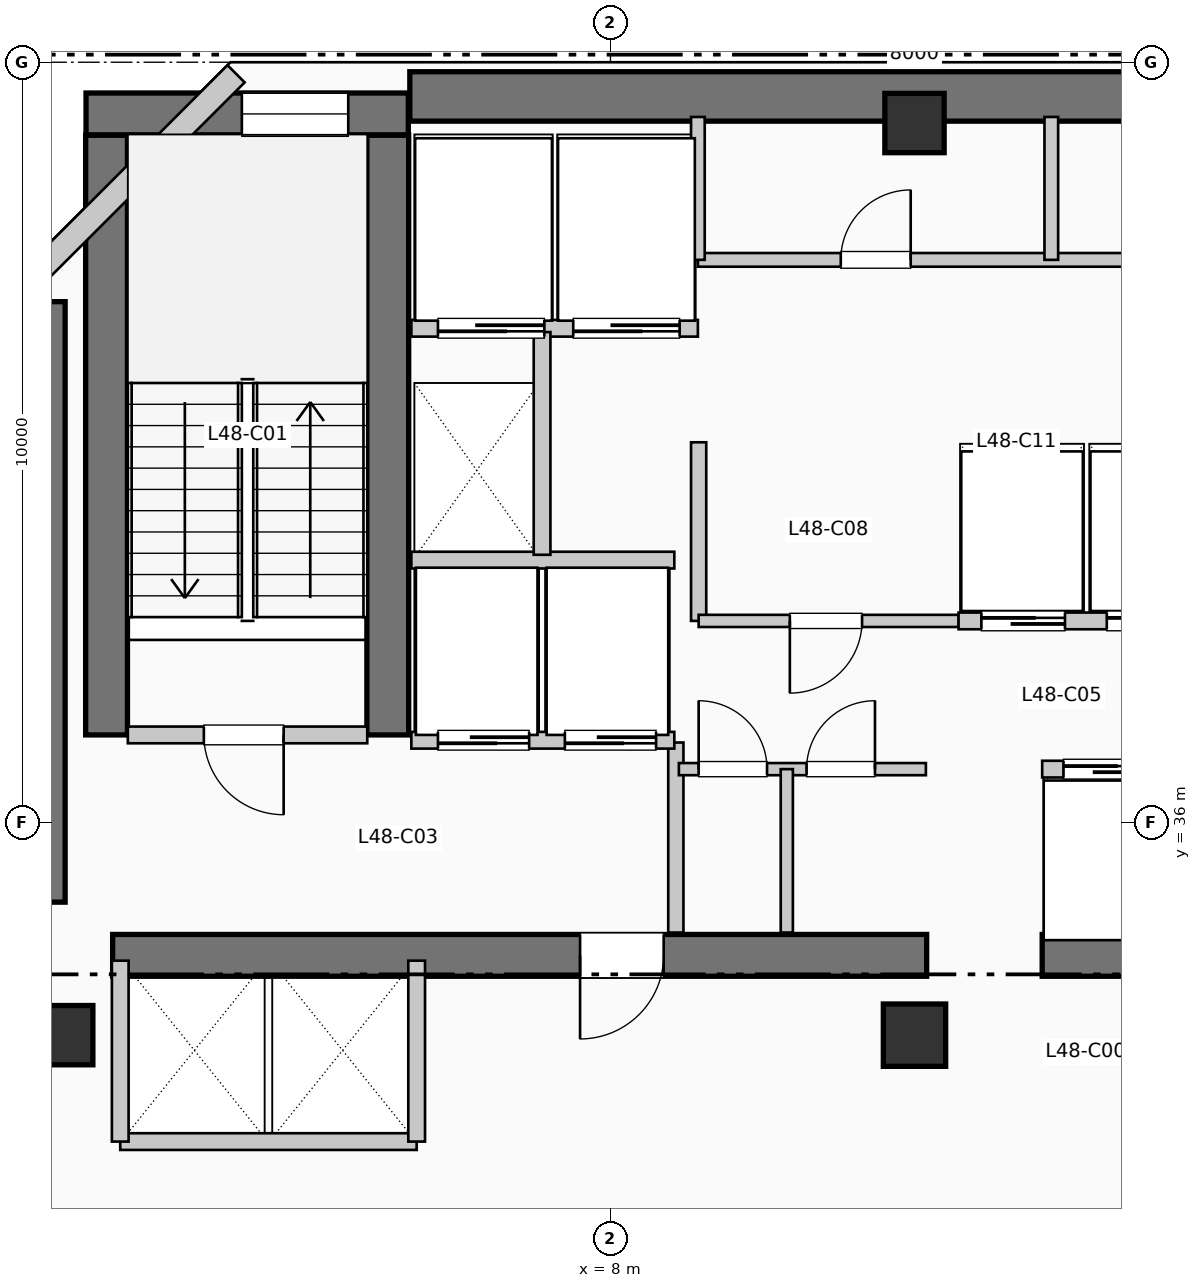
"""IFC4 building model, lengths in metres.
Left out: names, types, materials, properties, quantities, classifications, styles, units other than length and angle.
Written with IfcOpenShell. Run it as: python <this file> out.ifc"""

import sys

from ifc_helpers import new_model, si_unit, direction, frame, frame_2d, origin, origin_2d, place, context, subcontext, project, spatial, rectangle, extrude, element, fill, save


model = new_model("IFC4")
c1 = context("Model", 3, precision=1e-05, world=origin(), true_north=direction((0.0, 1.0)))
c2 = subcontext(c1, "Body", "Model", "MODEL_VIEW")
j1 = project(units=[si_unit("LENGTHUNIT", "METRE"), si_unit("PLANEANGLEUNIT", "RADIAN")], contexts=[c1])
p1 = place(None, origin())
s1 = spatial("IfcSite", under=j1, at=p1, CompositionType="ELEMENT")
p2 = place(p1, origin())
s2 = spatial("IfcBuilding", under=s1, at=p2, CompositionType="ELEMENT")
p3 = place(p2, frame((0.0, 0.0, 199.32)))
s3 = spatial("IfcBuildingStorey", under=s2, at=p3, CompositionType="ELEMENT", Elevation=199.32)
p4 = place(p3, frame((5.36, 45.55, 0.0), z_axis=(0.0, 0.0, 1.0), x_axis=(1.0, 0.0, 0.0)))
e1 = element("IfcWall", 1, at=p4, inside=s3, PredefinedType="SHEAR", context=c2, shape_type="SweptSolid", body=[
    extrude(rectangle(XDim=13.98, YDim=0.65, at=frame_2d((6.99, 0.0))), origin(), (0.0, 0.0, 1.0), 3.96),
])
p5 = place(p3, frame((0.5, 34.95, 0.0), z_axis=(0.0, 0.0, 1.0), x_axis=(0.0, 1.0, 0.0)))
e2 = element("IfcWall", 2, at=p5, inside=s3, PredefinedType="SHEAR", context=c2, shape_type="SweptSolid", body=[
    extrude(rectangle(XDim=7.9, YDim=0.65, at=frame_2d((3.95, 0.0))), origin(), (0.0, 0.0, 1.0), 3.96),
])
p6 = place(p3, frame((1.45, 34.25, 0.0), z_axis=(0.0, 0.0, 1.0), x_axis=(1.0, 0.0, 0.0)))
e3 = element("IfcWall", 3, at=p6, inside=s3, PredefinedType="SHEAR", context=c2, shape_type="SweptSolid", body=[
    extrude(rectangle(XDim=10.71, YDim=0.55, at=frame_2d((5.355, 0.0))), origin(), (0.0, 0.0, 1.0), 3.96),
])
p7 = place(p6, frame((7.25, 0.0, 0.0), z_axis=(0.0, 0.0, 1.0), x_axis=(-1.0, 0.0, 0.0)))
e4 = element("IfcOpeningElement", 4, at=p7, cuts=e3, PredefinedType="OPENING", context=c2, shape_type="SweptSolid", body=[
    extrude(rectangle(XDim=1.1, YDim=2.15, at=frame_2d((0.55, 1.075))), frame((0.0, 0.285, 0.0), z_axis=(0.0, -1.0, 0.0), x_axis=(1.0, 0.0, 0.0)), (0.0, 0.0, 1.0), 0.57),
])
p8 = place(p3, frame((13.68, 34.25, 0.0), z_axis=(0.0, 0.0, 1.0), x_axis=(1.0, 0.0, 0.0)))
e5 = element("IfcWall", 5, at=p8, inside=s3, PredefinedType="SHEAR", context=c2, shape_type="SweptSolid", body=[
    extrude(rectangle(XDim=6.12, YDim=0.55, at=frame_2d((3.06, 0.0))), origin(), (0.0, 0.0, 1.0), 3.96),
])
for number, where, z_axis, x_axis in (
    (6, (1.37, 37.15, 0.0), (0.0, 0.0, 1.0), (0.0, 1.0, 0.0)),
    (7, (5.07, 37.15, 0.0), (0.0, 0.0, 1.0), (0.0, 1.0, 0.0)),
):
    element("IfcWall", number, at=place(p3, frame(where, z_axis=z_axis, x_axis=x_axis)), inside=s3, PredefinedType="SHEAR", context=c2, shape_type="SweptSolid", body=[
        extrude(rectangle(XDim=7.89, YDim=0.55, at=frame_2d((3.945, 0.0))), origin(), (0.0, 0.0, 1.0), 3.96),
    ])
p9 = place(p3, frame((1.1, 45.32, 0.0), z_axis=(0.0, 0.0, 1.0), x_axis=(1.0, 0.0, 0.0)))
e8 = element("IfcWall", 8, at=p9, inside=s3, PredefinedType="SHEAR", context=c2, shape_type="SweptSolid", body=[
    extrude(rectangle(XDim=4.24, YDim=0.55, at=frame_2d((2.12, 0.0))), origin(), (0.0, 0.0, 1.0), 3.96),
])
p10 = place(p9, frame((2.05, 0.0, 1.05)))
e9 = element("IfcOpeningElement", 9, at=p10, cuts=e8, PredefinedType="OPENING", context=c2, shape_type="SweptSolid", body=[
    extrude(rectangle(XDim=1.4, YDim=1.8, at=frame_2d((0.7, 0.9))), frame((0.0, 0.285, 0.0), z_axis=(0.0, -1.0, 0.0), x_axis=(1.0, 0.0, 0.0)), (0.0, 0.0, 1.0), 0.57),
])
p11 = place(p3, frame((0.8, 33.2, 0.0), z_axis=(0.0, 0.0, 1.0), x_axis=(1.0, 0.0, 0.0)))
e10 = element("IfcColumn", 10, at=p11, inside=s3, PredefinedType="COLUMN", context=c2, shape_type="SweptSolid", body=[
    extrude(rectangle(XDim=0.78, YDim=0.78, at=origin_2d()), origin(), (0.0, 0.0, 1.0), 3.96),
])
p12 = place(p3, frame((12.0, 33.2, 0.0), z_axis=(0.0, 0.0, 1.0), x_axis=(1.0, 0.0, 0.0)))
e11 = element("IfcColumn", 11, at=p12, inside=s3, PredefinedType="COLUMN", context=c2, shape_type="SweptSolid", body=[
    extrude(rectangle(XDim=0.82, YDim=0.82, at=origin_2d()), origin(), (0.0, 0.0, 1.0), 3.96),
])
p13 = place(p3, frame((12.0, 45.2, 0.0), z_axis=(0.0, 0.0, 1.0), x_axis=(1.0, 0.0, 0.0)))
e12 = element("IfcColumn", 12, at=p13, inside=s3, PredefinedType="COLUMN", context=c2, shape_type="SweptSolid", body=[
    extrude(rectangle(XDim=0.78, YDim=0.78, at=origin_2d()), origin(), (0.0, 0.0, 1.0), 3.96),
])
p14 = place(p3, frame((3.074, 45.848, 0.0), z_axis=(0.0, 0.0, 1.0), x_axis=(-0.707106781187, -0.707106781187, 0.0)))
e13 = element("IfcWall", 13, at=p14, inside=s3, PredefinedType="SOLIDWALL", context=c2, shape_type="SweptSolid", body=[
    extrude(rectangle(XDim=4.133, YDim=0.32, at=frame_2d((2.066, 0.0))), origin(), (0.0, 0.0, 1.0), 3.71),
])
p15 = place(p3, frame((1.65, 37.15, 0.0), z_axis=(0.0, 0.0, 1.0), x_axis=(1.0, 0.0, 0.0)))
e14 = element("IfcWall", 14, at=p15, inside=s3, PredefinedType="PARTITIONING", context=c2, shape_type="SweptSolid", body=[
    extrude(rectangle(XDim=3.15, YDim=0.22, at=frame_2d((1.575, 0.0))), origin(), (0.0, 0.0, 1.0), 3.71),
])
p16 = place(p15, frame((2.05, 0.0, 0.0), z_axis=(0.0, 0.0, 1.0), x_axis=(-1.0, 0.0, 0.0)))
e15 = element("IfcOpeningElement", 15, at=p16, cuts=e14, PredefinedType="OPENING", context=c2, shape_type="SweptSolid", body=[
    extrude(rectangle(XDim=1.05, YDim=2.15, at=frame_2d((0.525, 1.075))), frame((0.0, 0.12, 0.0), z_axis=(0.0, -1.0, 0.0), x_axis=(1.0, 0.0, 0.0)), (0.0, 0.0, 1.0), 0.24),
])
p17 = place(p3, frame((8.86, 34.55, 0.0), z_axis=(0.0, 0.0, 1.0), x_axis=(0.0, 1.0, 0.0)))
e16 = element("IfcWall", 16, at=p17, inside=s3, PredefinedType="PARTITIONING", context=c2, shape_type="SweptSolid", body=[
    extrude(rectangle(XDim=2.5, YDim=0.2, at=frame_2d((1.25, 0.0))), origin(), (0.0, 0.0, 1.0), 3.71),
])
p18 = place(p3, frame((5.38, 37.08, 0.0), z_axis=(0.0, 0.0, 1.0), x_axis=(1.0, 0.0, 0.0)))
e17 = element("IfcWall", 17, at=p18, inside=s3, PredefinedType="PARTITIONING", context=c2, shape_type="SweptSolid", body=[
    extrude(rectangle(XDim=3.46, YDim=0.22, at=frame_2d((1.73, 0.0))), origin(), (0.0, 0.0, 1.0), 3.71),
])
p19 = place(p18, frame((1.55, 0.0, 0.0), z_axis=(0.0, 0.0, 1.0), x_axis=(-1.0, 0.0, 0.0)))
e18 = element("IfcOpeningElement", 18, at=p19, cuts=e17, PredefinedType="OPENING", context=c2, shape_type="SweptSolid", body=[
    extrude(rectangle(XDim=1.2, YDim=2.2, at=frame_2d((0.6, 1.1))), frame((0.0, 0.12, 0.0), z_axis=(0.0, -1.0, 0.0), x_axis=(1.0, 0.0, 0.0)), (0.0, 0.0, 1.0), 0.24),
])
p20 = place(p18, frame((3.22, 0.0, 0.0), z_axis=(0.0, 0.0, 1.0), x_axis=(-1.0, 0.0, 0.0)))
e19 = element("IfcOpeningElement", 19, at=p20, cuts=e17, PredefinedType="OPENING", context=c2, shape_type="SweptSolid", body=[
    extrude(rectangle(XDim=1.2, YDim=2.2, at=frame_2d((0.6, 1.1))), frame((0.0, 0.12, 0.0), z_axis=(0.0, -1.0, 0.0), x_axis=(1.0, 0.0, 0.0)), (0.0, 0.0, 1.0), 0.24),
])
p21 = place(p3, frame((5.38, 39.45, 0.0), z_axis=(0.0, 0.0, 1.0), x_axis=(1.0, 0.0, 0.0)))
e20 = element("IfcWall", 20, at=p21, inside=s3, PredefinedType="PARTITIONING", context=c2, shape_type="SweptSolid", body=[
    extrude(rectangle(XDim=3.46, YDim=0.22, at=frame_2d((1.73, 0.0))), origin(), (0.0, 0.0, 1.0), 3.71),
])
p22 = place(p3, frame((5.38, 42.5, 0.0), z_axis=(0.0, 0.0, 1.0), x_axis=(1.0, 0.0, 0.0)))
e21 = element("IfcWall", 21, at=p22, inside=s3, PredefinedType="PARTITIONING", context=c2, shape_type="SweptSolid", body=[
    extrude(rectangle(XDim=3.77, YDim=0.22, at=frame_2d((1.885, 0.0))), origin(), (0.0, 0.0, 1.0), 3.71),
])
p23 = place(p22, frame((1.75, 0.0, 0.0), z_axis=(0.0, 0.0, 1.0), x_axis=(-1.0, 0.0, 0.0)))
e22 = element("IfcOpeningElement", 22, at=p23, cuts=e21, PredefinedType="OPENING", context=c2, shape_type="SweptSolid", body=[
    extrude(rectangle(XDim=1.4, YDim=2.2, at=frame_2d((0.7, 1.1))), frame((0.0, 0.12, 0.0), z_axis=(0.0, -1.0, 0.0), x_axis=(1.0, 0.0, 0.0)), (0.0, 0.0, 1.0), 0.24),
])
p24 = place(p22, frame((3.53, 0.0, 0.0), z_axis=(0.0, 0.0, 1.0), x_axis=(-1.0, 0.0, 0.0)))
e23 = element("IfcOpeningElement", 23, at=p24, cuts=e21, PredefinedType="OPENING", context=c2, shape_type="SweptSolid", body=[
    extrude(rectangle(XDim=1.4, YDim=2.2, at=frame_2d((0.7, 1.1))), frame((0.0, 0.12, 0.0), z_axis=(0.0, -1.0, 0.0), x_axis=(1.0, 0.0, 0.0)), (0.0, 0.0, 1.0), 0.24),
])
p25 = place(p3, frame((7.1, 39.52, 0.0), z_axis=(0.0, 0.0, 1.0), x_axis=(0.0, 1.0, 0.0)))
e24 = element("IfcWall", 24, at=p25, inside=s3, PredefinedType="PARTITIONING", context=c2, shape_type="SweptSolid", body=[
    extrude(rectangle(XDim=2.93, YDim=0.22, at=frame_2d((1.465, 0.0))), origin(), (0.0, 0.0, 1.0), 3.71),
])
p26 = place(p3, frame((1.55, 31.8, 0.0), z_axis=(0.0, 0.0, 1.0), x_axis=(1.0, 0.0, 0.0)))
e25 = element("IfcWall", 25, at=p26, inside=s3, PredefinedType="PARTITIONING", context=c2, shape_type="SweptSolid", body=[
    extrude(rectangle(XDim=3.9, YDim=0.22, at=frame_2d((1.95, 0.0))), origin(), (0.0, 0.0, 1.0), 3.71),
])
for number, where, z_axis, x_axis in (
    (26, (1.55, 31.8, 0.0), (0.0, 0.0, 1.0), (0.0, 1.0, 0.0)),
    (27, (5.45, 31.8, 0.0), (0.0, 0.0, 1.0), (0.0, 1.0, 0.0)),
):
    element("IfcWall", number, at=place(p3, frame(where, z_axis=z_axis, x_axis=x_axis)), inside=s3, PredefinedType="PARTITIONING", context=c2, shape_type="SweptSolid", body=[
        extrude(rectangle(XDim=2.38, YDim=0.22, at=frame_2d((1.19, 0.0))), origin(), (0.0, 0.0, 1.0), 3.71),
    ])
p27 = place(p3, frame((9.16, 38.65, 0.0), z_axis=(0.0, 0.0, 1.0), x_axis=(0.0, 1.0, 0.0)))
e28 = element("IfcWall", 28, at=p27, inside=s3, PredefinedType="PARTITIONING", context=c2, shape_type="SweptSolid", body=[
    extrude(rectangle(XDim=2.35, YDim=0.2, at=frame_2d((1.175, 0.0))), origin(), (0.0, 0.0, 1.0), 3.71),
])
p28 = place(p3, frame((8.9, 36.7, 0.0), z_axis=(0.0, 0.0, 1.0), x_axis=(1.0, 0.0, 0.0)))
e29 = element("IfcWall", 29, at=p28, inside=s3, PredefinedType="PARTITIONING", context=c2, shape_type="SweptSolid", body=[
    extrude(rectangle(XDim=3.25, YDim=0.16, at=frame_2d((1.625, 0.0))), origin(), (0.0, 0.0, 1.0), 3.71),
])
p29 = place(p28, frame((0.26, 0.0, 0.0)))
e30 = element("IfcOpeningElement", 30, at=p29, cuts=e29, PredefinedType="OPENING", context=c2, shape_type="SweptSolid", body=[
    extrude(rectangle(XDim=0.9, YDim=2.15, at=frame_2d((0.45, 1.075))), frame((0.0, 0.09, 0.0), z_axis=(0.0, -1.0, 0.0), x_axis=(1.0, 0.0, 0.0)), (0.0, 0.0, 1.0), 0.18),
])
p30 = place(p28, frame((1.68, 0.0, 0.0)))
e31 = element("IfcOpeningElement", 31, at=p30, cuts=e29, PredefinedType="OPENING", context=c2, shape_type="SweptSolid", body=[
    extrude(rectangle(XDim=0.9, YDim=2.15, at=frame_2d((0.45, 1.075))), frame((0.0, 0.09, 0.0), z_axis=(0.0, -1.0, 0.0), x_axis=(1.0, 0.0, 0.0)), (0.0, 0.0, 1.0), 0.18),
])
p31 = place(p3, frame((10.32, 34.55, 0.0), z_axis=(0.0, 0.0, 1.0), x_axis=(0.0, 1.0, 0.0)))
e32 = element("IfcWall", 32, at=p31, inside=s3, PredefinedType="PARTITIONING", context=c2, shape_type="SweptSolid", body=[
    extrude(rectangle(XDim=2.15, YDim=0.16, at=frame_2d((1.075, 0.0))), origin(), (0.0, 0.0, 1.0), 3.71),
])
p32 = place(p3, frame((9.16, 38.65, 0.0), z_axis=(0.0, 0.0, 1.0), x_axis=(1.0, 0.0, 0.0)))
e33 = element("IfcWall", 33, at=p32, inside=s3, PredefinedType="PARTITIONING", context=c2, shape_type="SweptSolid", body=[
    extrude(rectangle(XDim=3.42, YDim=0.16, at=frame_2d((1.71, 0.0))), origin(), (0.0, 0.0, 1.0), 3.71),
])
p33 = place(p32, frame((2.15, 0.0, 0.0), z_axis=(0.0, 0.0, 1.0), x_axis=(-1.0, 0.0, 0.0)))
e34 = element("IfcOpeningElement", 34, at=p33, cuts=e33, PredefinedType="OPENING", context=c2, shape_type="SweptSolid", body=[
    extrude(rectangle(XDim=0.95, YDim=2.15, at=frame_2d((0.475, 1.075))), frame((0.0, 0.09, 0.0), z_axis=(0.0, -1.0, 0.0), x_axis=(1.0, 0.0, 0.0)), (0.0, 0.0, 1.0), 0.18),
])
p34 = place(p3, frame((13.68, 36.7, 0.0), z_axis=(0.0, 0.0, 1.0), x_axis=(1.0, 0.0, 0.0)))
e35 = element("IfcWall", 35, at=p34, inside=s3, PredefinedType="PARTITIONING", context=c2, shape_type="SweptSolid", body=[
    extrude(rectangle(XDim=3.28, YDim=0.22, at=frame_2d((1.64, 0.0))), origin(), (0.0, 0.0, 1.0), 3.71),
])
p35 = place(p34, frame((0.28, 0.0, 0.0)))
e36 = element("IfcOpeningElement", 36, at=p35, cuts=e35, PredefinedType="OPENING", context=c2, shape_type="SweptSolid", body=[
    extrude(rectangle(XDim=1.1, YDim=2.2, at=frame_2d((0.55, 1.1))), frame((0.0, 0.12, 0.0), z_axis=(0.0, -1.0, 0.0), x_axis=(1.0, 0.0, 0.0)), (0.0, 0.0, 1.0), 0.24),
])
p36 = place(p34, frame((1.9, 0.0, 0.0)))
e37 = element("IfcOpeningElement", 37, at=p36, cuts=e35, PredefinedType="OPENING", context=c2, shape_type="SweptSolid", body=[
    extrude(rectangle(XDim=1.1, YDim=2.2, at=frame_2d((0.55, 1.1))), frame((0.0, 0.12, 0.0), z_axis=(0.0, -1.0, 0.0), x_axis=(1.0, 0.0, 0.0)), (0.0, 0.0, 1.0), 0.24),
])
p37 = place(p3, frame((12.58, 38.65, 0.0), z_axis=(0.0, 0.0, 1.0), x_axis=(1.0, 0.0, 0.0)))
e38 = element("IfcWall", 38, at=p37, inside=s3, PredefinedType="PARTITIONING", context=c2, shape_type="SweptSolid", body=[
    extrude(rectangle(XDim=3.38, YDim=0.22, at=frame_2d((1.69, 0.0))), origin(), (0.0, 0.0, 1.0), 3.71),
])
p38 = place(p37, frame((0.3, 0.0, 0.0)))
e39 = element("IfcOpeningElement", 39, at=p38, cuts=e38, PredefinedType="OPENING", context=c2, shape_type="SweptSolid", body=[
    extrude(rectangle(XDim=1.1, YDim=2.2, at=frame_2d((0.55, 1.1))), frame((0.0, 0.12, 0.0), z_axis=(0.0, -1.0, 0.0), x_axis=(1.0, 0.0, 0.0)), (0.0, 0.0, 1.0), 0.24),
])
p39 = place(p37, frame((1.95, 0.0, 0.0)))
e40 = element("IfcOpeningElement", 40, at=p39, cuts=e38, PredefinedType="OPENING", context=c2, shape_type="SweptSolid", body=[
    extrude(rectangle(XDim=1.1, YDim=2.2, at=frame_2d((0.55, 1.1))), frame((0.0, 0.12, 0.0), z_axis=(0.0, -1.0, 0.0), x_axis=(1.0, 0.0, 0.0)), (0.0, 0.0, 1.0), 0.24),
])
p40 = place(p3, frame((9.15, 43.4, 0.0), z_axis=(0.0, 0.0, 1.0), x_axis=(1.0, 0.0, 0.0)))
e41 = element("IfcWall", 41, at=p40, inside=s3, PredefinedType="PLUMBINGWALL", context=c2, shape_type="SweptSolid", body=[
    extrude(rectangle(XDim=9.33, YDim=0.18, at=frame_2d((4.665, 0.0))), origin(), (0.0, 0.0, 1.0), 3.71),
])
p41 = place(p40, frame((1.88, 0.0, 0.0)))
e42 = element("IfcOpeningElement", 42, at=p41, cuts=e41, PredefinedType="OPENING", context=c2, shape_type="SweptSolid", body=[
    extrude(rectangle(XDim=0.92, YDim=2.1, at=frame_2d((0.46, 1.05))), frame((0.0, 0.1, 0.0), z_axis=(0.0, -1.0, 0.0), x_axis=(1.0, 0.0, 0.0)), (0.0, 0.0, 1.0), 0.2),
])
p42 = place(p40, frame((6.515, 0.0, 0.0)))
e43 = element("IfcOpeningElement", 43, at=p42, cuts=e41, PredefinedType="OPENING", context=c2, shape_type="SweptSolid", body=[
    extrude(rectangle(XDim=0.92, YDim=2.1, at=frame_2d((0.46, 1.05))), frame((0.0, 0.1, 0.0), z_axis=(0.0, -1.0, 0.0), x_axis=(1.0, 0.0, 0.0)), (0.0, 0.0, 1.0), 0.2),
])
for number, where, z_axis, x_axis in (
    (44, (9.15, 43.4, 0.0), (0.0, 0.0, 1.0), (0.0, 1.0, 0.0)),
    (45, (13.8, 43.4, 0.0), (0.0, 0.0, 1.0), (0.0, 1.0, 0.0)),
):
    element("IfcWall", number, at=place(p3, frame(where, z_axis=z_axis, x_axis=x_axis)), inside=s3, PredefinedType="PLUMBINGWALL", context=c2, shape_type="SweptSolid", body=[
        extrude(rectangle(XDim=1.88, YDim=0.18, at=frame_2d((0.94, 0.0))), origin(), (0.0, 0.0, 1.0), 3.71),
    ])
p43 = place(p10, origin())
e46 = element("IfcWindow", 46, at=p43, inside=s3, PartitioningType="SINGLE_PANEL", PredefinedType="WINDOW", context=c2, shape_type="SweptSolid", body=[
    extrude(rectangle(XDim=1.4, YDim=1.8, at=frame_2d((0.7, 0.9))), frame((0.0, 0.03, 0.0), z_axis=(0.0, -1.0, 0.0), x_axis=(1.0, 0.0, 0.0)), (0.0, 0.0, 1.0), 0.06),
])
fill(e9, e46)
p44 = place(p16, origin())
e47 = element("IfcDoor", 47, at=p44, inside=s3, OperationType="SINGLE_SWING_RIGHT", PredefinedType="DOOR", context=c2, shape_type="SweptSolid", body=[
    extrude(rectangle(XDim=1.05, YDim=2.15, at=frame_2d((0.525, 1.075))), frame((0.0, 0.025, 0.0), z_axis=(0.0, -1.0, 0.0), x_axis=(1.0, 0.0, 0.0)), (0.0, 0.0, 1.0), 0.05),
])
fill(e15, e47)
p45 = place(p7, origin())
e48 = element("IfcDoor", 48, at=p45, inside=s3, OperationType="SINGLE_SWING_LEFT", PredefinedType="DOOR", context=c2, shape_type="SweptSolid", body=[
    extrude(rectangle(XDim=1.1, YDim=2.15, at=frame_2d((0.55, 1.075))), frame((0.0, 0.025, 0.0), z_axis=(0.0, -1.0, 0.0), x_axis=(1.0, 0.0, 0.0)), (0.0, 0.0, 1.0), 0.05),
])
fill(e4, e48)
p46 = place(p19, origin())
e49 = element("IfcDoor", 49, at=p46, inside=s3, OperationType="SLIDING_TO_RIGHT", PredefinedType="DOOR", context=c2, shape_type="SweptSolid", body=[
    extrude(rectangle(XDim=1.2, YDim=2.2, at=frame_2d((0.6, 1.1))), frame((0.0, 0.025, 0.0), z_axis=(0.0, -1.0, 0.0), x_axis=(1.0, 0.0, 0.0)), (0.0, 0.0, 1.0), 0.05),
])
fill(e18, e49)
p47 = place(p20, origin())
e50 = element("IfcDoor", 50, at=p47, inside=s3, OperationType="SLIDING_TO_RIGHT", PredefinedType="DOOR", context=c2, shape_type="SweptSolid", body=[
    extrude(rectangle(XDim=1.2, YDim=2.2, at=frame_2d((0.6, 1.1))), frame((0.0, 0.025, 0.0), z_axis=(0.0, -1.0, 0.0), x_axis=(1.0, 0.0, 0.0)), (0.0, 0.0, 1.0), 0.05),
])
fill(e19, e50)
p48 = place(p23, origin())
e51 = element("IfcDoor", 51, at=p48, inside=s3, OperationType="SLIDING_TO_LEFT", PredefinedType="DOOR", context=c2, shape_type="SweptSolid", body=[
    extrude(rectangle(XDim=1.4, YDim=2.2, at=frame_2d((0.7, 1.1))), frame((0.0, 0.025, 0.0), z_axis=(0.0, -1.0, 0.0), x_axis=(1.0, 0.0, 0.0)), (0.0, 0.0, 1.0), 0.05),
])
fill(e22, e51)
p49 = place(p24, origin())
e52 = element("IfcDoor", 52, at=p49, inside=s3, OperationType="SLIDING_TO_LEFT", PredefinedType="DOOR", context=c2, shape_type="SweptSolid", body=[
    extrude(rectangle(XDim=1.4, YDim=2.2, at=frame_2d((0.7, 1.1))), frame((0.0, 0.025, 0.0), z_axis=(0.0, -1.0, 0.0), x_axis=(1.0, 0.0, 0.0)), (0.0, 0.0, 1.0), 0.05),
])
fill(e23, e52)
p50 = place(p29, origin())
e53 = element("IfcDoor", 53, at=p50, inside=s3, OperationType="SINGLE_SWING_LEFT", PredefinedType="DOOR", context=c2, shape_type="SweptSolid", body=[
    extrude(rectangle(XDim=0.9, YDim=2.15, at=frame_2d((0.45, 1.075))), frame((0.0, 0.025, 0.0), z_axis=(0.0, -1.0, 0.0), x_axis=(1.0, 0.0, 0.0)), (0.0, 0.0, 1.0), 0.05),
])
fill(e30, e53)
p51 = place(p30, origin())
e54 = element("IfcDoor", 54, at=p51, inside=s3, OperationType="SINGLE_SWING_RIGHT", PredefinedType="DOOR", context=c2, shape_type="SweptSolid", body=[
    extrude(rectangle(XDim=0.9, YDim=2.15, at=frame_2d((0.45, 1.075))), frame((0.0, 0.025, 0.0), z_axis=(0.0, -1.0, 0.0), x_axis=(1.0, 0.0, 0.0)), (0.0, 0.0, 1.0), 0.05),
])
fill(e31, e54)
p52 = place(p33, origin())
e55 = element("IfcDoor", 55, at=p52, inside=s3, OperationType="SINGLE_SWING_LEFT", PredefinedType="DOOR", context=c2, shape_type="SweptSolid", body=[
    extrude(rectangle(XDim=0.95, YDim=2.15, at=frame_2d((0.475, 1.075))), frame((0.0, 0.025, 0.0), z_axis=(0.0, -1.0, 0.0), x_axis=(1.0, 0.0, 0.0)), (0.0, 0.0, 1.0), 0.05),
])
fill(e34, e55)
p53 = place(p35, origin())
e56 = element("IfcDoor", 56, at=p53, inside=s3, OperationType="SLIDING_TO_RIGHT", PredefinedType="DOOR", context=c2, shape_type="SweptSolid", body=[
    extrude(rectangle(XDim=1.1, YDim=2.2, at=frame_2d((0.55, 1.1))), frame((0.0, 0.025, 0.0), z_axis=(0.0, -1.0, 0.0), x_axis=(1.0, 0.0, 0.0)), (0.0, 0.0, 1.0), 0.05),
])
fill(e36, e56)
p54 = place(p38, origin())
e57 = element("IfcDoor", 57, at=p54, inside=s3, OperationType="SLIDING_TO_RIGHT", PredefinedType="DOOR", context=c2, shape_type="SweptSolid", body=[
    extrude(rectangle(XDim=1.1, YDim=2.2, at=frame_2d((0.55, 1.1))), frame((0.0, 0.025, 0.0), z_axis=(0.0, -1.0, 0.0), x_axis=(1.0, 0.0, 0.0)), (0.0, 0.0, 1.0), 0.05),
])
fill(e39, e57)
p55 = place(p39, origin())
e58 = element("IfcDoor", 58, at=p55, inside=s3, OperationType="SLIDING_TO_RIGHT", PredefinedType="DOOR", context=c2, shape_type="SweptSolid", body=[
    extrude(rectangle(XDim=1.1, YDim=2.2, at=frame_2d((0.55, 1.1))), frame((0.0, 0.025, 0.0), z_axis=(0.0, -1.0, 0.0), x_axis=(1.0, 0.0, 0.0)), (0.0, 0.0, 1.0), 0.05),
])
fill(e40, e58)
p56 = place(p41, origin())
e59 = element("IfcDoor", 59, at=p56, inside=s3, OperationType="SINGLE_SWING_RIGHT", PredefinedType="DOOR", context=c2, shape_type="SweptSolid", body=[
    extrude(rectangle(XDim=0.92, YDim=2.1, at=frame_2d((0.46, 1.05))), frame((0.0, 0.025, 0.0), z_axis=(0.0, -1.0, 0.0), x_axis=(1.0, 0.0, 0.0)), (0.0, 0.0, 1.0), 0.05),
])
fill(e42, e59)
save(model, sys.argv[1])
